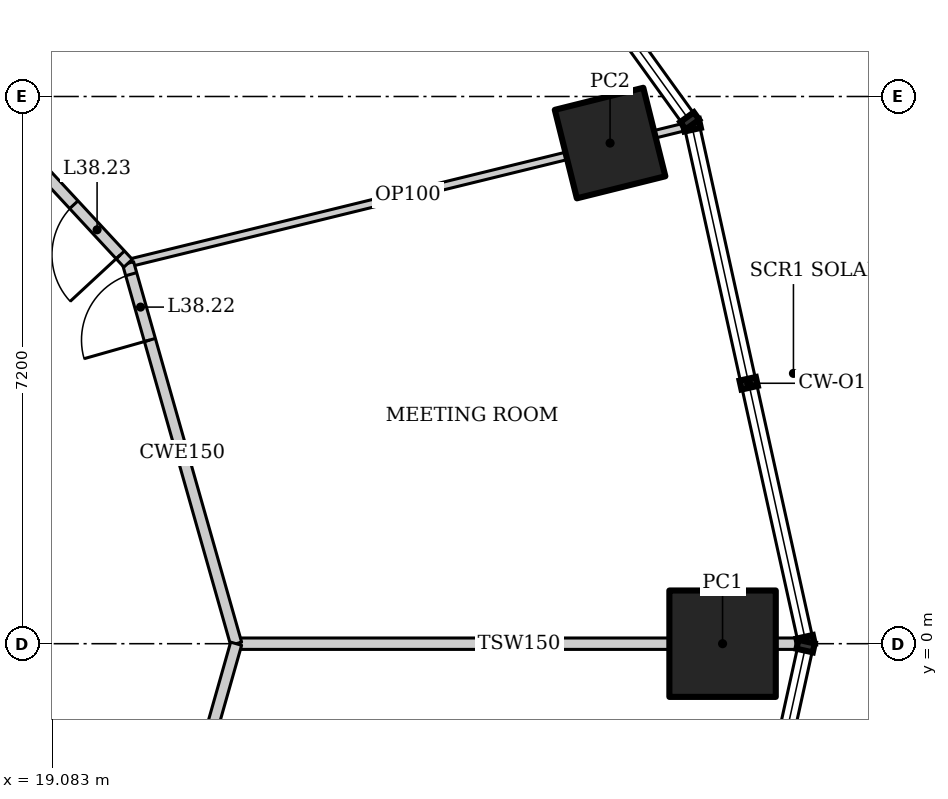
"""IFC4 building model, lengths in metres.
Left out: names, types, materials, properties, quantities, classifications, styles, units other than length and angle.
Written with IfcOpenShell. Run it as: python <this file> out.ifc"""

import sys

from ifc_helpers import new_model, si_unit, direction, frame, frame_2d, origin, origin_2d, place, context, subcontext, project, spatial, rectangle, hollow_rectangle, extrude, element, fill, save


model = new_model("IFC4")
c1 = context("Model", 3, precision=1e-05, world=origin(), true_north=direction((0.0, 1.0)))
c2 = subcontext(c1, "Body", "Model", "MODEL_VIEW")
j1 = project(units=[si_unit("LENGTHUNIT", "METRE"), si_unit("PLANEANGLEUNIT", "RADIAN")], contexts=[c1])
p1 = place(None, origin())
s1 = spatial("IfcSite", under=j1, at=p1, CompositionType="ELEMENT")
p2 = place(p1, origin())
s2 = spatial("IfcBuilding", under=s1, at=p2, CompositionType="ELEMENT")
p3 = place(p2, frame((0.0, 0.0, 163.6)))
s3 = spatial("IfcBuildingStorey", under=s2, at=p3, CompositionType="ELEMENT", Elevation=163.6)
p4 = place(p3, frame((27.9, 0.0, 0.0), z_axis=(0.0, 0.0, 1.0), x_axis=(1.0, 0.0, 0.0)))
e1 = element("IfcColumn", 1, at=p4, inside=s3, PredefinedType="COLUMN", context=c2, shape_type="SweptSolid", body=[
    extrude(hollow_rectangle(XDim=1.4, YDim=1.4, WallThickness=0.1, at=origin_2d()), origin(), (0.0, 0.0, 1.0), 4.2),
])
p5 = place(p3, frame((26.42, 6.587, 0.0), z_axis=(0.0, 0.0, 1.0), x_axis=(0.970295726276, 0.2419218956, 0.0)))
e2 = element("IfcColumn", 2, at=p5, inside=s3, PredefinedType="COLUMN", context=c2, shape_type="SweptSolid", body=[
    extrude(hollow_rectangle(XDim=1.2, YDim=1.2, WallThickness=0.1, at=origin_2d()), origin(), (0.0, 0.0, 1.0), 4.2),
])
p6 = place(p3, frame((28.944, 0.0, 0.0), z_axis=(0.0, 0.0, 1.0), x_axis=(-1.0, 0.0, 0.0)))
e3 = element("IfcWall", 3, at=p6, inside=s3, PredefinedType="PARTITIONING", context=c2, shape_type="SweptSolid", body=[
    extrude(rectangle(XDim=7.444, YDim=0.15, at=frame_2d((3.722, 0.0))), origin(), (0.0, 0.0, 1.0), 3.204),
])
p7 = place(p3, frame((27.441, 6.809, 0.0), z_axis=(0.0, 0.0, 1.0), x_axis=(-0.971305815804, -0.237834001323, 0.0)))
e4 = element("IfcWall", 4, at=p7, inside=s3, PredefinedType="PARTITIONING", context=c2, shape_type="SweptSolid", body=[
    extrude(rectangle(XDim=7.58, YDim=0.1, at=frame_2d((3.79, 0.0))), origin(), (0.0, 0.0, 1.0), 3.113),
])
p8 = place(p3, frame((21.5, 0.0, 0.0), z_axis=(0.0, 0.0, 1.0), x_axis=(-0.273177936169, 0.961963520717, 0.0)))
e5 = element("IfcWall", 5, at=p8, inside=s3, PredefinedType="PARTITIONING", context=c2, shape_type="SweptSolid", body=[
    extrude(rectangle(XDim=5.204, YDim=0.15, at=frame_2d((2.602, 0.0))), origin(), (0.0, 0.0, 1.0), 4.05),
])
p9 = place(p8, frame((4.154, 0.0, 0.0)))
e6 = element("IfcOpeningElement", 6, at=p9, cuts=e5, PredefinedType="OPENING", context=c2, shape_type="SweptSolid", body=[
    extrude(rectangle(XDim=0.9, YDim=2.1, at=frame_2d((0.45, 1.05))), frame((0.0, 0.085, 0.0), z_axis=(0.0, -1.0, 0.0), x_axis=(1.0, 0.0, 0.0)), (0.0, 0.0, 1.0), 0.17),
])
p10 = place(p3, frame((20.078, 5.006, 0.0), z_axis=(0.0, 0.0, 1.0), x_axis=(-0.679724658223, 0.733467374191, 0.0)))
e7 = element("IfcWall", 7, at=p10, inside=s3, PredefinedType="PARTITIONING", context=c2, shape_type="SweptSolid", body=[
    extrude(rectangle(XDim=5.765, YDim=0.15, at=frame_2d((2.882, 0.0))), origin(), (0.0, 0.0, 1.0), 4.05),
])
p11 = place(p10, frame((0.15, 0.0, 0.0)))
e8 = element("IfcOpeningElement", 8, at=p11, cuts=e7, PredefinedType="OPENING", context=c2, shape_type="SweptSolid", body=[
    extrude(rectangle(XDim=0.9, YDim=2.1, at=frame_2d((0.45, 1.05))), frame((0.0, 0.085, 0.0), z_axis=(0.0, -1.0, 0.0), x_axis=(1.0, 0.0, 0.0)), (0.0, 0.0, 1.0), 0.17),
])
p12 = place(p3, frame((20.078, -5.006, 0.0), z_axis=(0.0, 0.0, 1.0), x_axis=(0.273177936169, 0.961963520717, 0.0)))
e9 = element("IfcWall", 9, at=p12, inside=s3, PredefinedType="PARTITIONING", context=c2, shape_type="SweptSolid", body=[
    extrude(rectangle(XDim=5.204, YDim=0.15, at=frame_2d((2.602, 0.0))), origin(), (0.0, 0.0, 1.0), 4.05),
])
p13 = place(p12, frame((0.15, 0.0, 0.0)))
e10 = element("IfcOpeningElement", 10, at=p13, cuts=e9, PredefinedType="OPENING", context=c2, shape_type="SweptSolid", body=[
    extrude(rectangle(XDim=0.9, YDim=2.1, at=frame_2d((0.45, 1.05))), frame((0.0, 0.085, 0.0), z_axis=(0.0, -1.0, 0.0), x_axis=(1.0, 0.0, 0.0)), (0.0, 0.0, 1.0), 0.17),
])
p14 = place(p9, origin())
e11 = element("IfcDoor", 11, at=p14, inside=s3, OperationType="SINGLE_SWING_LEFT", PredefinedType="DOOR", context=c2, shape_type="SweptSolid", body=[
    extrude(rectangle(XDim=0.9, YDim=2.1, at=frame_2d((0.45, 1.05))), frame((0.0, 0.025, 0.0), z_axis=(0.0, -1.0, 0.0), x_axis=(1.0, 0.0, 0.0)), (0.0, 0.0, 1.0), 0.05),
])
fill(e6, e11)
p15 = place(p11, origin())
e12 = element("IfcDoor", 12, at=p15, inside=s3, OperationType="SINGLE_SWING_LEFT", PredefinedType="DOOR", context=c2, shape_type="SweptSolid", body=[
    extrude(rectangle(XDim=0.9, YDim=2.1, at=frame_2d((0.45, 1.05))), frame((0.0, 0.025, 0.0), z_axis=(0.0, -1.0, 0.0), x_axis=(1.0, 0.0, 0.0)), (0.0, 0.0, 1.0), 0.05),
])
fill(e8, e12)
save(model, sys.argv[1])
